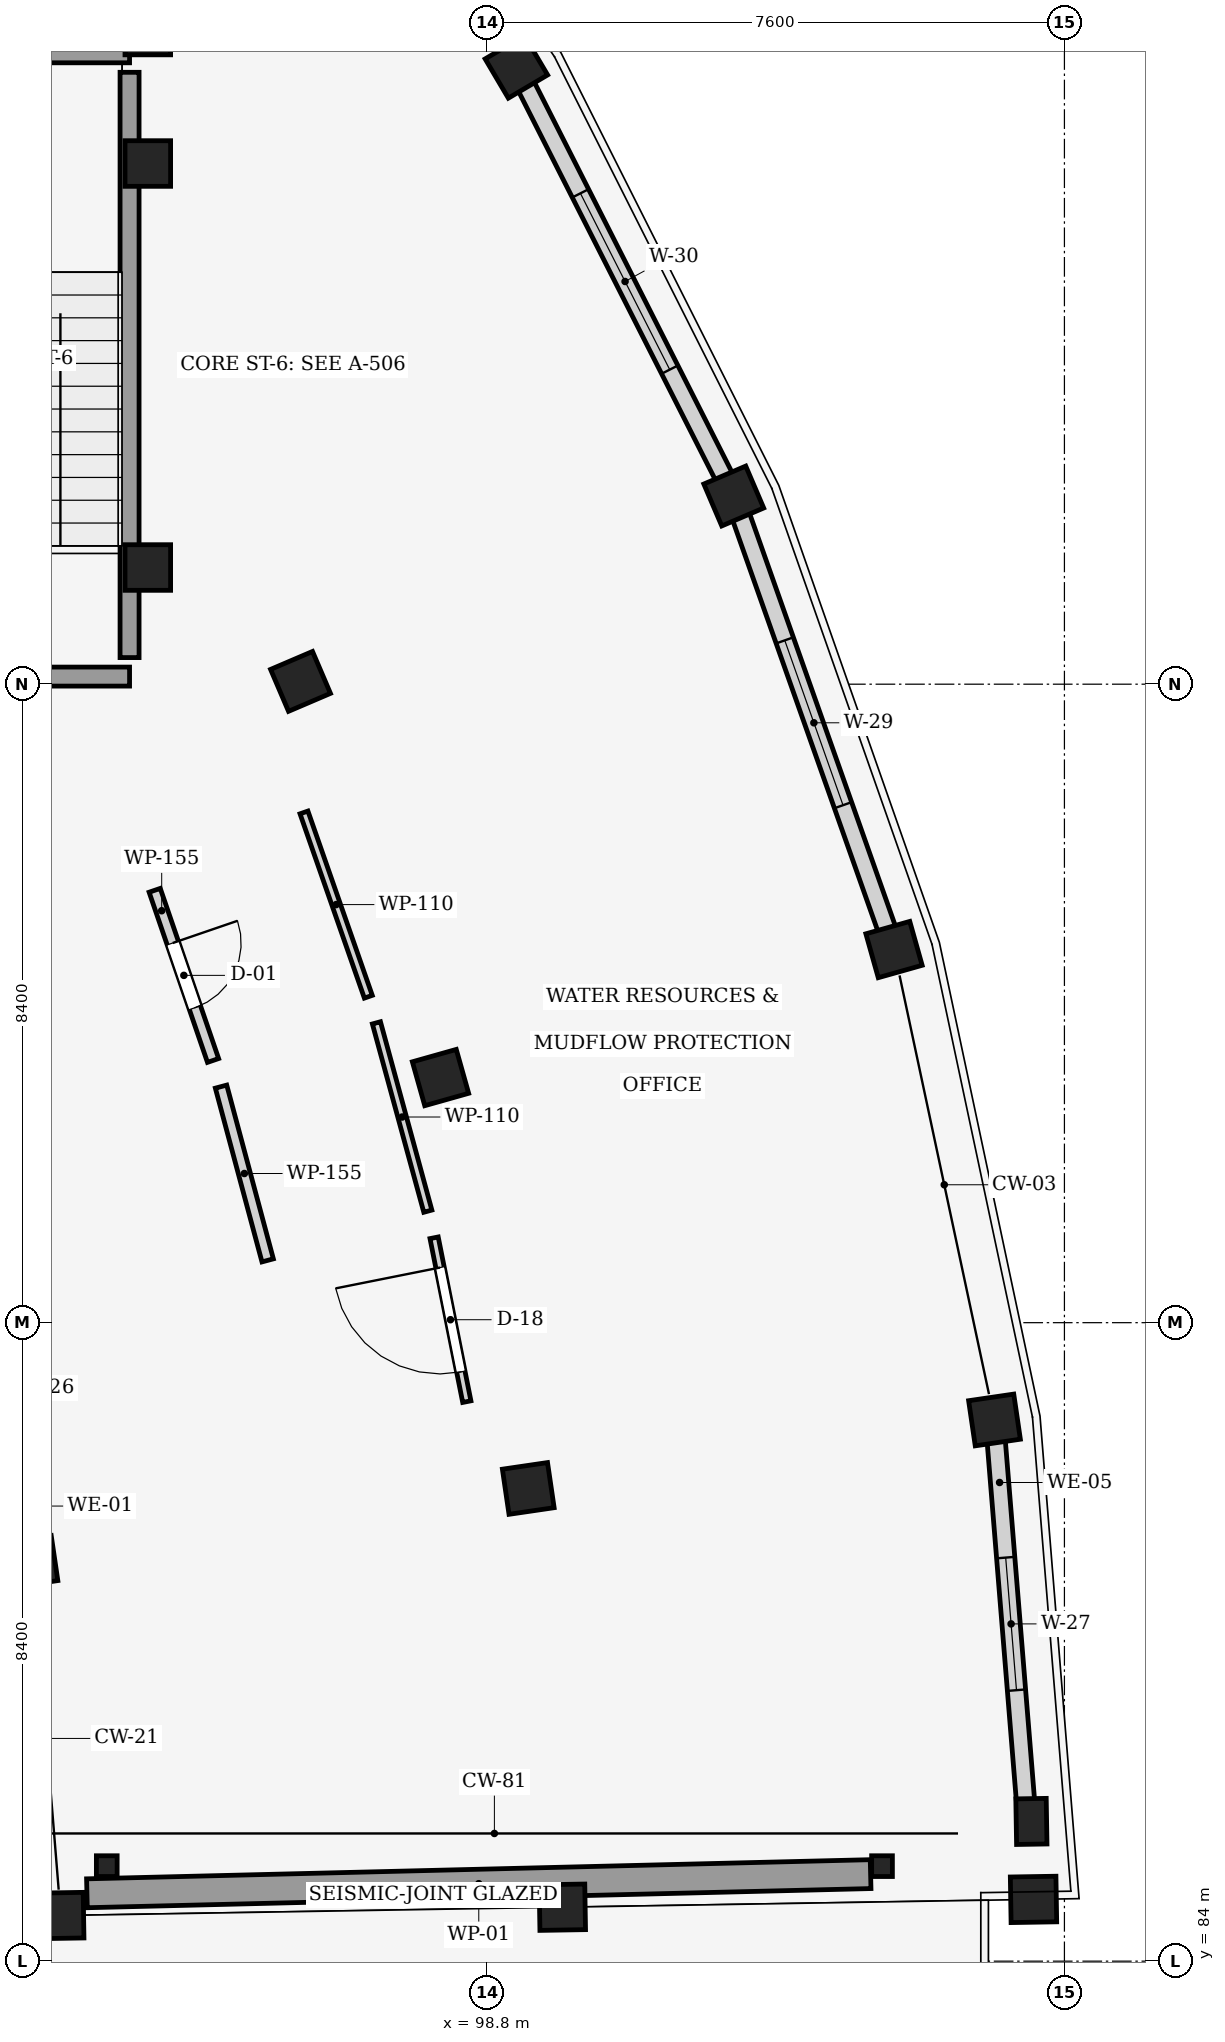
"""IFC4 building model, lengths in metres.
Left out: names, types, materials, properties, quantities, classifications, styles, units other than length and angle.
Written with IfcOpenShell. Run it as: python <this file> out.ifc"""

import sys

from ifc_helpers import new_model, si_unit, direction, frame, frame_2d, origin, origin_2d, place, context, subcontext, project, spatial, rectangle, hollow_circle, extrude, element, fill, save


model = new_model("IFC4")
c1 = context("Model", 3, precision=1e-05, world=origin(), true_north=direction((0.0, 1.0)))
c2 = subcontext(c1, "Body", "Model", "MODEL_VIEW")
j1 = project(units=[si_unit("LENGTHUNIT", "METRE"), si_unit("PLANEANGLEUNIT", "RADIAN")], contexts=[c1])
p1 = place(None, origin())
s1 = spatial("IfcSite", under=j1, at=p1, CompositionType="ELEMENT")
p2 = place(p1, origin())
s2 = spatial("IfcBuilding", under=s1, at=p2, CompositionType="ELEMENT")
p3 = place(p2, frame((0.0, 0.0, 9.15)))
s3 = spatial("IfcBuildingStorey", under=s2, at=p3, CompositionType="ELEMENT", Elevation=9.15)
for number, where, z_axis, x_axis in (
    (1, (93.195, 84.6, 0.0), (0.0, 0.0, 1.0), (1.0, 0.017, 0.0)),
    (2, (99.794, 84.71, 0.0), (0.0, 0.0, 1.0), (1.0, 0.017, 0.0)),
    (3, (105.993, 84.812, 0.0), (0.0, 0.0, 1.0), (1.0, 0.017, 0.0)),
):
    element("IfcColumn", number, at=place(p3, frame(where, z_axis=z_axis, x_axis=x_axis)), inside=s3, PredefinedType="COLUMN", context=c2, shape_type="SweptSolid", body=[
        extrude(rectangle(XDim=0.6, YDim=0.6, at=origin_2d()), origin(), (0.0, 0.0, 1.0), 4.05),
    ])
p4 = place(p3, frame((105.966, 85.838, 0.0), z_axis=(0.0, 0.0, 1.0), x_axis=(0.999862544538, 0.016579868188, 0.0)))
e4 = element("IfcColumn", 4, at=p4, inside=s3, PredefinedType="PILASTER", context=c2, shape_type="SweptSolid", body=[
    extrude(rectangle(XDim=0.4, YDim=0.6, at=origin_2d()), origin(), (0.0, 0.0, 1.0), 4.05),
])
for number, where, z_axis, x_axis in (
    (5, (92.816, 89.26, 0.0), (0.0, 0.0, 1.0), (0.989, 0.145, 0.0)),
    (6, (99.346, 90.219, 0.0), (0.0, 0.0, 1.0), (0.989, 0.145, 0.0)),
    (7, (105.48, 91.12, 0.0), (0.0, 0.0, 1.0), (0.989, 0.145, 0.0)),
    (8, (98.191, 95.625, 0.0), (0.0, 0.0, 1.0), (0.962, 0.272, 0.0)),
    (9, (104.158, 97.309, 0.0), (0.0, 0.0, 1.0), (0.962, 0.272, 0.0)),
    (10, (96.349, 100.837, 0.0), (0.0, 0.0, 1.0), (0.919, 0.393, 0.0)),
    (11, (102.049, 103.276, 0.0), (0.0, 0.0, 1.0), (0.919, 0.393, 0.0)),
    (12, (99.189, 108.921, 0.0), (0.0, 0.0, 1.0), (0.861, 0.509, 0.0)),
):
    element("IfcColumn", number, at=place(p3, frame(where, z_axis=z_axis, x_axis=x_axis)), inside=s3, PredefinedType="COLUMN", context=c2, shape_type="SweptSolid", body=[
        extrude(rectangle(XDim=0.6, YDim=0.6, at=origin_2d()), origin(), (0.0, 0.0, 1.0), 4.05),
    ])
for number, where, z_axis, x_axis in (
    (13, (104.0, 85.25, 0.0), (0.0, 0.0, 1.0), (1.0, 0.0, 0.0)),
    (14, (93.8, 85.25, 0.0), (0.0, 0.0, 1.0), (1.0, 0.0, 0.0)),
):
    element("IfcColumn", number, at=place(p3, frame(where, z_axis=z_axis, x_axis=x_axis)), inside=s3, PredefinedType="COLUMN", context=c2, shape_type="SweptSolid", body=[
        extrude(hollow_circle(Radius=0.136, WallThickness=0.016, at=origin_2d()), origin(), (0.0, 0.0, 1.0), 3.82),
    ])
for number, where, z_axis, x_axis in (
    (15, (94.34, 102.335, 0.0), (0.0, 0.0, 1.0), (1.0, 0.0, 0.0)),
    (16, (94.34, 107.65, 0.0), (0.0, 0.0, 1.0), (1.0, 0.0, 0.0)),
    (17, (94.34, 109.38, 0.0), (0.0, 0.0, 1.0), (1.0, 0.0, 0.0)),
):
    element("IfcColumn", number, at=place(p3, frame(where, z_axis=z_axis, x_axis=x_axis)), inside=s3, PredefinedType="COLUMN", context=c2, shape_type="SweptSolid", body=[
        extrude(rectangle(XDim=0.6, YDim=0.6, at=origin_2d()), origin(), (0.0, 0.0, 1.0), 4.05),
    ])
p5 = place(p3, frame((105.499, 90.885, 0.0), z_axis=(0.0, 0.0, 1.0), x_axis=(0.081149437974, -0.996701945777, 0.0)))
e18 = element("IfcWall", 18, at=p5, inside=s3, PredefinedType="STANDARD", context=c2, shape_type="SweptSolid", body=[
    extrude(rectangle(XDim=4.913, YDim=0.24, at=frame_2d((2.457, 0.0))), origin(), (0.0, 0.0, 1.0), 3.015),
])
p6 = place(p5, frame((1.581, 0.0, 0.85)))
e19 = element("IfcOpeningElement", 19, at=p6, cuts=e18, PredefinedType="OPENING", context=c2, shape_type="SweptSolid", body=[
    extrude(rectangle(XDim=1.75, YDim=1.85, at=frame_2d((0.875, 0.925))), frame((0.0, 0.13, 0.0), z_axis=(0.0, -1.0, 0.0), x_axis=(1.0, 0.0, 0.0)), (0.0, 0.0, 1.0), 0.26),
])
p7 = place(p3, frame((102.132, 103.041, 0.0), z_axis=(0.0, 0.0, 1.0), x_axis=(0.333212182882, -0.942851865978, 0.0)))
e20 = element("IfcWall", 20, at=p7, inside=s3, PredefinedType="STANDARD", context=c2, shape_type="SweptSolid", body=[
    extrude(rectangle(XDim=5.83, YDim=0.24, at=frame_2d((2.915, 0.0))), origin(), (0.0, 0.0, 1.0), 3.015),
])
p8 = place(p7, frame((1.765, 0.0, 0.85)))
e21 = element("IfcOpeningElement", 21, at=p8, cuts=e20, PredefinedType="OPENING", context=c2, shape_type="SweptSolid", body=[
    extrude(rectangle(XDim=2.3, YDim=1.85, at=frame_2d((1.15, 0.925))), frame((0.0, 0.13, 0.0), z_axis=(0.0, -1.0, 0.0), x_axis=(1.0, 0.0, 0.0)), (0.0, 0.0, 1.0), 0.26),
])
p9 = place(p3, frame((99.309, 108.686, 0.0), z_axis=(0.0, 0.0, 1.0), x_axis=(0.451920591159, -0.892058170349, 0.0)))
e22 = element("IfcWall", 22, at=p9, inside=s3, PredefinedType="STANDARD", context=c2, shape_type="SweptSolid", body=[
    extrude(rectangle(XDim=5.802, YDim=0.24, at=frame_2d((2.901, 0.0))), origin(), (0.0, 0.0, 1.0), 3.015),
])
p10 = place(p9, frame((1.601, 0.0, 0.85)))
e23 = element("IfcOpeningElement", 23, at=p10, cuts=e22, PredefinedType="OPENING", context=c2, shape_type="SweptSolid", body=[
    extrude(rectangle(XDim=2.6, YDim=1.85, at=frame_2d((1.3, 0.925))), frame((0.0, 0.13, 0.0), z_axis=(0.0, -1.0, 0.0), x_axis=(1.0, 0.0, 0.0)), (0.0, 0.0, 1.0), 0.26),
])
p11 = place(p3, frame((103.85, 85.145, 0.0), z_axis=(0.0, 0.0, 1.0), x_axis=(-0.999701591947, -0.024427997417, 0.0)))
e24 = element("IfcWall", 24, at=p11, inside=s3, PredefinedType="SHEAR", context=c2, shape_type="SweptSolid", body=[
    extrude(rectangle(XDim=10.314, YDim=0.38, at=frame_2d((5.157, 0.0))), origin(), (0.0, 0.0, 1.0), 3.75),
])
p12 = place(p3, frame((94.1, 100.9, 0.0), z_axis=(0.0, 0.0, 1.0), x_axis=(-1.0, 0.0, 0.0)))
e25 = element("IfcWall", 25, at=p12, inside=s3, PredefinedType="SHEAR", context=c2, shape_type="SweptSolid", body=[
    extrude(rectangle(XDim=3.64, YDim=0.25, at=frame_2d((1.82, 0.0))), origin(), (0.0, 0.0, 1.0), 4.05),
])
p13 = place(p12, frame((1.145, 0.0, 0.0)))
e26 = element("IfcOpeningElement", 26, at=p13, cuts=e25, PredefinedType="OPENING", context=c2, shape_type="SweptSolid", body=[
    extrude(rectangle(XDim=1.35, YDim=2.2, at=frame_2d((0.675, 1.1))), frame((0.0, 0.135, 0.0), z_axis=(0.0, -1.0, 0.0), x_axis=(1.0, 0.0, 0.0)), (0.0, 0.0, 1.0), 0.27),
])
p14 = place(p3, frame((90.46, 109.1, 0.0), z_axis=(0.0, 0.0, 1.0), x_axis=(1.0, 0.0, 0.0)))
e27 = element("IfcWall", 27, at=p14, inside=s3, PredefinedType="SHEAR", context=c2, shape_type="SweptSolid", body=[
    extrude(rectangle(XDim=3.64, YDim=0.25, at=frame_2d((1.82, 0.0))), origin(), (0.0, 0.0, 1.0), 4.05),
])
p15 = place(p3, frame((94.1, 108.85, 0.0), z_axis=(0.0, 0.0, 1.0), x_axis=(0.0, -1.0, 0.0)))
e28 = element("IfcWall", 28, at=p15, inside=s3, PredefinedType="SHEAR", context=c2, shape_type="SweptSolid", body=[
    extrude(rectangle(XDim=7.7, YDim=0.25, at=frame_2d((3.85, 0.0))), origin(), (0.0, 0.0, 1.0), 4.05),
])
p16 = place(p3, frame((98.024, 93.867, 0.0), z_axis=(0.0, 0.0, 1.0), x_axis=(-0.263415008431, 0.964682607562, 0.0)))
e29 = element("IfcWall", 29, at=p16, inside=s3, PredefinedType="PARTITIONING", context=c2, shape_type="SweptSolid", body=[
    extrude(rectangle(XDim=2.568, YDim=0.11, at=frame_2d((1.284, 0.0))), origin(), (0.0, 0.0, 1.0), 3.015),
])
p17 = place(p3, frame((98.537, 91.361, 0.0), z_axis=(0.0, 0.0, 1.0), x_axis=(-0.195795764222, 0.980644695449, 0.0)))
e30 = element("IfcWall", 30, at=p17, inside=s3, PredefinedType="PARTITIONING", context=c2, shape_type="SweptSolid", body=[
    extrude(rectangle(XDim=2.198, YDim=0.11, at=frame_2d((1.099, 0.0))), origin(), (0.0, 0.0, 1.0), 3.7),
])
p18 = place(p17, frame((0.399, 0.0, 0.0)))
e31 = element("IfcOpeningElement", 31, at=p18, cuts=e30, PredefinedType="OPENING", context=c2, shape_type="SweptSolid", body=[
    extrude(rectangle(XDim=1.4, YDim=2.35, at=frame_2d((0.7, 1.175))), frame((0.0, 0.065, 0.0), z_axis=(0.0, -1.0, 0.0), x_axis=(1.0, 0.0, 0.0)), (0.0, 0.0, 1.0), 0.13),
])
p19 = place(p3, frame((97.241, 96.688, 0.0), z_axis=(0.0, 0.0, 1.0), x_axis=(-0.32957120556, 0.944130722128, 0.0)))
e32 = element("IfcWall", 32, at=p19, inside=s3, PredefinedType="PARTITIONING", context=c2, shape_type="SweptSolid", body=[
    extrude(rectangle(XDim=2.568, YDim=0.11, at=frame_2d((1.284, 0.0))), origin(), (0.0, 0.0, 1.0), 3.7),
])
p20 = place(p3, frame((94.431, 98.088, 0.0), z_axis=(0.0, 0.0, 1.0), x_axis=(0.324416625627, -0.945914294752, 0.0)))
e33 = element("IfcWall", 33, at=p20, inside=s3, PredefinedType="PARTITIONING", context=c2, shape_type="SweptSolid", body=[
    extrude(rectangle(XDim=2.367, YDim=0.155, at=frame_2d((1.183, 0.0))), origin(), (0.0, 0.0, 1.0), 3.7),
])
p21 = place(p20, frame((0.733, 0.0, 0.0)))
e34 = element("IfcOpeningElement", 34, at=p21, cuts=e33, PredefinedType="OPENING", context=c2, shape_type="SweptSolid", body=[
    extrude(rectangle(XDim=0.9, YDim=2.1, at=frame_2d((0.45, 1.05))), frame((0.0, 0.087, 0.0), z_axis=(0.0, -1.0, 0.0), x_axis=(1.0, 0.0, 0.0)), (0.0, 0.0, 1.0), 0.175),
])
p22 = place(p3, frame((95.304, 95.506, 0.0), z_axis=(0.0, 0.0, 1.0), x_axis=(0.259100404283, -0.9658503924, 0.0)))
e35 = element("IfcWall", 35, at=p22, inside=s3, PredefinedType="PARTITIONING", context=c2, shape_type="SweptSolid", body=[
    extrude(rectangle(XDim=2.367, YDim=0.155, at=frame_2d((1.184, 0.0))), origin(), (0.0, 0.0, 1.0), 3.015),
])
p23 = place(p6, origin())
e36 = element("IfcWindow", 36, at=p23, inside=s3, PartitioningType="SINGLE_PANEL", PredefinedType="WINDOW", context=c2, shape_type="SweptSolid", body=[
    extrude(rectangle(XDim=1.75, YDim=1.85, at=frame_2d((0.875, 0.925))), frame((0.0, 0.03, 0.0), z_axis=(0.0, -1.0, 0.0), x_axis=(1.0, 0.0, 0.0)), (0.0, 0.0, 1.0), 0.06),
])
fill(e19, e36)
p24 = place(p8, origin())
e37 = element("IfcWindow", 37, at=p24, inside=s3, PartitioningType="SINGLE_PANEL", PredefinedType="WINDOW", context=c2, shape_type="SweptSolid", body=[
    extrude(rectangle(XDim=2.3, YDim=1.85, at=frame_2d((1.15, 0.925))), frame((0.0, 0.03, 0.0), z_axis=(0.0, -1.0, 0.0), x_axis=(1.0, 0.0, 0.0)), (0.0, 0.0, 1.0), 0.06),
])
fill(e21, e37)
p25 = place(p10, origin())
e38 = element("IfcWindow", 38, at=p25, inside=s3, PartitioningType="SINGLE_PANEL", PredefinedType="WINDOW", context=c2, shape_type="SweptSolid", body=[
    extrude(rectangle(XDim=2.6, YDim=1.85, at=frame_2d((1.3, 0.925))), frame((0.0, 0.03, 0.0), z_axis=(0.0, -1.0, 0.0), x_axis=(1.0, 0.0, 0.0)), (0.0, 0.0, 1.0), 0.06),
])
fill(e23, e38)
p26 = place(p18, origin())
e39 = element("IfcDoor", 39, at=p26, inside=s3, OperationType="SINGLE_SWING_RIGHT", PredefinedType="DOOR", context=c2, shape_type="SweptSolid", body=[
    extrude(rectangle(XDim=1.4, YDim=2.35, at=frame_2d((0.7, 1.175))), frame((0.0, 0.025, 0.0), z_axis=(0.0, -1.0, 0.0), x_axis=(1.0, 0.0, 0.0)), (0.0, 0.0, 1.0), 0.05),
])
fill(e31, e39)
p27 = place(p21, origin())
e40 = element("IfcDoor", 40, at=p27, inside=s3, OperationType="SINGLE_SWING_LEFT", PredefinedType="DOOR", context=c2, shape_type="SweptSolid", body=[
    extrude(rectangle(XDim=0.9, YDim=2.1, at=frame_2d((0.45, 1.05))), frame((0.0, 0.025, 0.0), z_axis=(0.0, -1.0, 0.0), x_axis=(1.0, 0.0, 0.0)), (0.0, 0.0, 1.0), 0.05),
])
fill(e34, e40)
save(model, sys.argv[1])
